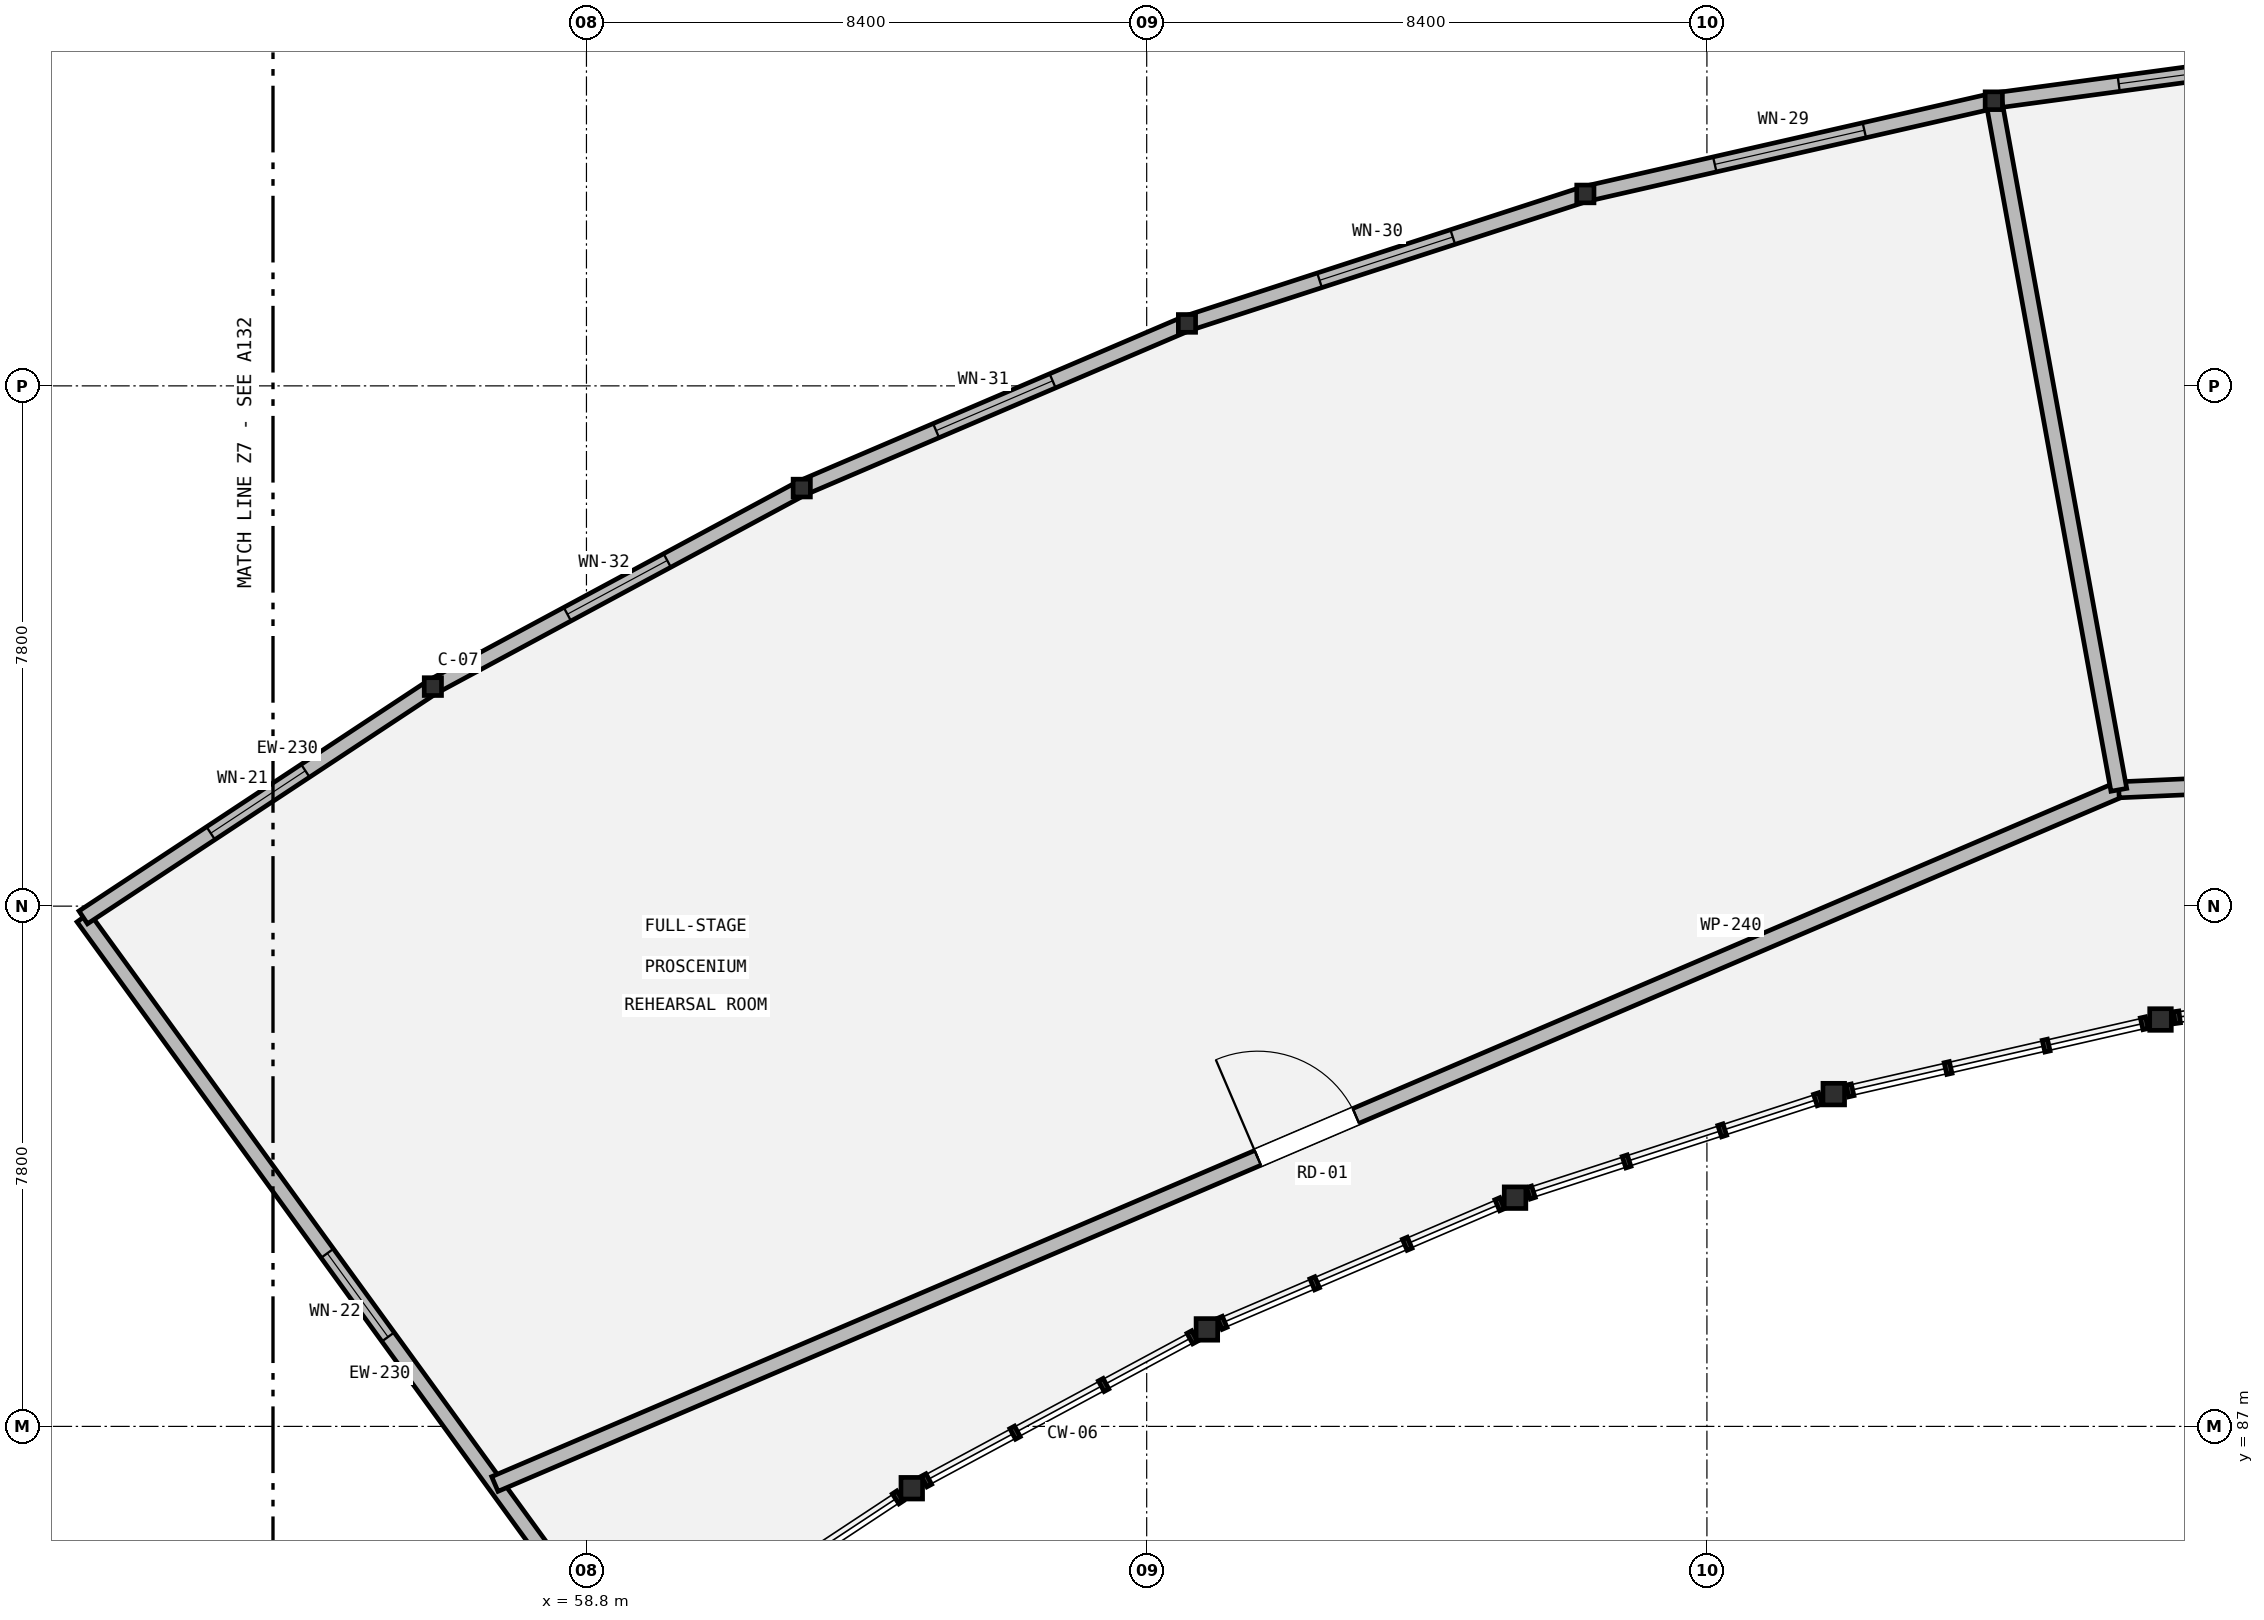
"""IFC4 building model, lengths in metres.
Left out: names, types, materials, properties, quantities, classifications, styles, units other than length and angle.
Written with IfcOpenShell. Run it as: python <this file> out.ifc"""

import sys

from ifc_helpers import new_model, si_unit, direction, frame, frame_2d, origin, origin_2d, place, context, subcontext, project, spatial, rectangle, hollow_circle, i_section, extrude, element, fill, save


model = new_model("IFC4")
c1 = context("Model", 3, precision=1e-05, world=origin(), true_north=direction((0.0, 1.0)))
c2 = subcontext(c1, "Body", "Model", "MODEL_VIEW")
j1 = project(units=[si_unit("LENGTHUNIT", "METRE"), si_unit("PLANEANGLEUNIT", "RADIAN")], contexts=[c1])
p1 = place(None, origin())
s1 = spatial("IfcSite", under=j1, at=p1, CompositionType="ELEMENT")
p2 = place(p1, origin())
s2 = spatial("IfcBuilding", under=s1, at=p2, CompositionType="ELEMENT")
p3 = place(p2, frame((0.0, 0.0, 10.2)))
s3 = spatial("IfcBuildingStorey", under=s2, at=p3, CompositionType="ELEMENT", Elevation=10.2)
p4 = place(p3, frame((51.255, 94.631, 0.0), z_axis=(0.0, 0.0, 1.0), x_axis=(1.0, 0.0, 0.0)))
e1 = element("IfcColumn", 1, at=p4, inside=s3, PredefinedType="COLUMN", context=c2, shape_type="SweptSolid", body=[
    extrude(i_section(OverallWidth=0.259, OverallDepth=0.267, WebThickness=0.013, FlangeThickness=0.021, FilletRadius=0.013, at=origin_2d()), origin(), (0.0, 0.0, 1.0), 4.8),
])
p5 = place(p3, frame((63.677, 86.073, 0.0), z_axis=(0.0, 0.0, 1.0), x_axis=(1.0, 0.0, 0.0)))
e2 = element("IfcColumn", 2, at=p5, inside=s3, PredefinedType="COLUMN", context=c2, shape_type="SweptSolid", body=[
    extrude(hollow_circle(Radius=0.162, WallThickness=0.012, at=origin_2d()), origin(), (0.0, 0.0, 1.0), 4.8),
])
p6 = place(p3, frame((56.497, 98.091, 0.0), z_axis=(0.0, 0.0, 1.0), x_axis=(1.0, 0.0, 0.0)))
e3 = element("IfcColumn", 3, at=p6, inside=s3, PredefinedType="COLUMN", context=c2, shape_type="SweptSolid", body=[
    extrude(i_section(OverallWidth=0.259, OverallDepth=0.267, WebThickness=0.013, FlangeThickness=0.021, FilletRadius=0.013, at=origin_2d()), origin(), (0.0, 0.0, 1.0), 4.8),
])
p7 = place(p3, frame((68.103, 88.454, 0.0), z_axis=(0.0, 0.0, 1.0), x_axis=(1.0, 0.0, 0.0)))
e4 = element("IfcColumn", 4, at=p7, inside=s3, PredefinedType="COLUMN", context=c2, shape_type="SweptSolid", body=[
    extrude(hollow_circle(Radius=0.162, WallThickness=0.012, at=origin_2d()), origin(), (0.0, 0.0, 1.0), 4.8),
])
p8 = place(p3, frame((62.028, 101.068, 0.0), z_axis=(0.0, 0.0, 1.0), x_axis=(1.0, 0.0, 0.0)))
e5 = element("IfcColumn", 5, at=p8, inside=s3, PredefinedType="COLUMN", context=c2, shape_type="SweptSolid", body=[
    extrude(i_section(OverallWidth=0.259, OverallDepth=0.267, WebThickness=0.013, FlangeThickness=0.021, FilletRadius=0.013, at=origin_2d()), origin(), (0.0, 0.0, 1.0), 4.8),
])
p9 = place(p3, frame((72.723, 90.429, 0.0), z_axis=(0.0, 0.0, 1.0), x_axis=(1.0, 0.0, 0.0)))
e6 = element("IfcColumn", 6, at=p9, inside=s3, PredefinedType="COLUMN", context=c2, shape_type="SweptSolid", body=[
    extrude(hollow_circle(Radius=0.162, WallThickness=0.012, at=origin_2d()), origin(), (0.0, 0.0, 1.0), 4.8),
])
p10 = place(p3, frame((67.804, 103.536, 0.0), z_axis=(0.0, 0.0, 1.0), x_axis=(1.0, 0.0, 0.0)))
e7 = element("IfcColumn", 7, at=p10, inside=s3, PredefinedType="COLUMN", context=c2, shape_type="SweptSolid", body=[
    extrude(i_section(OverallWidth=0.259, OverallDepth=0.267, WebThickness=0.013, FlangeThickness=0.021, FilletRadius=0.013, at=origin_2d()), origin(), (0.0, 0.0, 1.0), 4.8),
])
p11 = place(p3, frame((77.502, 91.982, 0.0), z_axis=(0.0, 0.0, 1.0), x_axis=(1.0, 0.0, 0.0)))
e8 = element("IfcColumn", 8, at=p11, inside=s3, PredefinedType="COLUMN", context=c2, shape_type="SweptSolid", body=[
    extrude(hollow_circle(Radius=0.162, WallThickness=0.012, at=origin_2d()), origin(), (0.0, 0.0, 1.0), 4.8),
])
p12 = place(p3, frame((73.777, 105.477, 0.0), z_axis=(0.0, 0.0, 1.0), x_axis=(1.0, 0.0, 0.0)))
e9 = element("IfcColumn", 9, at=p12, inside=s3, PredefinedType="COLUMN", context=c2, shape_type="SweptSolid", body=[
    extrude(i_section(OverallWidth=0.259, OverallDepth=0.267, WebThickness=0.013, FlangeThickness=0.021, FilletRadius=0.013, at=origin_2d()), origin(), (0.0, 0.0, 1.0), 4.8),
])
p13 = place(p3, frame((82.401, 93.1, 0.0), z_axis=(0.0, 0.0, 1.0), x_axis=(1.0, 0.0, 0.0)))
e10 = element("IfcColumn", 10, at=p13, inside=s3, PredefinedType="COLUMN", context=c2, shape_type="SweptSolid", body=[
    extrude(hollow_circle(Radius=0.162, WallThickness=0.012, at=origin_2d()), origin(), (0.0, 0.0, 1.0), 4.8),
])
p14 = place(p3, frame((79.901, 106.875, 0.0), z_axis=(0.0, 0.0, 1.0), x_axis=(1.0, 0.0, 0.0)))
e11 = element("IfcColumn", 11, at=p14, inside=s3, PredefinedType="COLUMN", context=c2, shape_type="SweptSolid", body=[
    extrude(i_section(OverallWidth=0.259, OverallDepth=0.267, WebThickness=0.013, FlangeThickness=0.021, FilletRadius=0.013, at=origin_2d()), origin(), (0.0, 0.0, 1.0), 4.8),
])
p15 = place(p3, frame((59.484, 83.305, 0.0), z_axis=(0.0, 0.0, 1.0), x_axis=(-0.587787980643, 0.809015012105, 0.0)))
e12 = element("IfcWall", 12, at=p15, inside=s3, PredefinedType="STANDARD", context=c2, shape_type="SweptSolid", body=[
    extrude(rectangle(XDim=14.0, YDim=0.23, at=frame_2d((7.0, 0.0))), origin(), (0.0, 0.0, 1.0), 4.059),
])
p16 = place(p15, frame((6.225, 0.0, 0.9)))
e13 = element("IfcOpeningElement", 13, at=p16, cuts=e12, PredefinedType="OPENING", context=c2, shape_type="SweptSolid", body=[
    extrude(rectangle(XDim=1.55, YDim=1.6, at=frame_2d((0.775, 0.8))), frame((0.0, 0.125, 0.0), z_axis=(0.0, -1.0, 0.0), x_axis=(1.0, 0.0, 0.0)), (0.0, 0.0, 1.0), 0.25),
])
p17 = place(p3, frame((51.255, 94.631, 0.0), z_axis=(0.0, 0.0, 1.0), x_axis=(0.834582959038, 0.550882278244, 0.0)))
e14 = element("IfcWall", 14, at=p17, inside=s3, PredefinedType="STANDARD", context=c2, shape_type="SweptSolid", body=[
    extrude(rectangle(XDim=6.281, YDim=0.23, at=frame_2d((3.141, 0.0))), origin(), (0.0, 0.0, 1.0), 4.059),
])
p18 = place(p17, frame((2.291, 0.0, 0.9)))
e15 = element("IfcOpeningElement", 15, at=p18, cuts=e14, PredefinedType="OPENING", context=c2, shape_type="SweptSolid", body=[
    extrude(rectangle(XDim=1.7, YDim=1.6, at=frame_2d((0.85, 0.8))), frame((0.0, 0.125, 0.0), z_axis=(0.0, -1.0, 0.0), x_axis=(1.0, 0.0, 0.0)), (0.0, 0.0, 1.0), 0.25),
])
p19 = place(p3, frame((56.497, 98.091, 0.0), z_axis=(0.0, 0.0, 1.0), x_axis=(0.880582156138, 0.473893517883, 0.0)))
e16 = element("IfcWall", 16, at=p19, inside=s3, PredefinedType="STANDARD", context=c2, shape_type="SweptSolid", body=[
    extrude(rectangle(XDim=6.281, YDim=0.23, at=frame_2d((3.141, 0.0))), origin(), (0.0, 0.0, 1.0), 4.059),
])
p20 = place(p19, frame((2.291, 0.0, 0.9)))
e17 = element("IfcOpeningElement", 17, at=p20, cuts=e16, PredefinedType="OPENING", context=c2, shape_type="SweptSolid", body=[
    extrude(rectangle(XDim=1.7, YDim=1.95, at=frame_2d((0.85, 0.975))), frame((0.0, 0.125, 0.0), z_axis=(0.0, -1.0, 0.0), x_axis=(1.0, 0.0, 0.0)), (0.0, 0.0, 1.0), 0.25),
])
p21 = place(p3, frame((62.028, 101.068, 0.0), z_axis=(0.0, 0.0, 1.0), x_axis=(0.919534614305, 0.393009024189, 0.0)))
e18 = element("IfcWall", 18, at=p21, inside=s3, PredefinedType="STANDARD", context=c2, shape_type="SweptSolid", body=[
    extrude(rectangle(XDim=6.281, YDim=0.23, at=frame_2d((3.141, 0.0))), origin(), (0.0, 0.0, 1.0), 4.059),
])
p22 = place(p21, frame((2.191, 0.0, 0.9)))
e19 = element("IfcOpeningElement", 19, at=p22, cuts=e18, PredefinedType="OPENING", context=c2, shape_type="SweptSolid", body=[
    extrude(rectangle(XDim=1.9, YDim=1.95, at=frame_2d((0.95, 0.975))), frame((0.0, 0.125, 0.0), z_axis=(0.0, -1.0, 0.0), x_axis=(1.0, 0.0, 0.0)), (0.0, 0.0, 1.0), 0.25),
])
p23 = place(p3, frame((67.804, 103.536, 0.0), z_axis=(0.0, 0.0, 1.0), x_axis=(0.951058059905, 0.309012243593, 0.0)))
e20 = element("IfcWall", 20, at=p23, inside=s3, PredefinedType="STANDARD", context=c2, shape_type="SweptSolid", body=[
    extrude(rectangle(XDim=6.281, YDim=0.23, at=frame_2d((3.141, 0.0))), origin(), (0.0, 0.0, 1.0), 4.059),
])
p24 = place(p23, frame((2.091, 0.0, 0.9)))
e21 = element("IfcOpeningElement", 21, at=p24, cuts=e20, PredefinedType="OPENING", context=c2, shape_type="SweptSolid", body=[
    extrude(rectangle(XDim=2.1, YDim=1.95, at=frame_2d((1.05, 0.975))), frame((0.0, 0.125, 0.0), z_axis=(0.0, -1.0, 0.0), x_axis=(1.0, 0.0, 0.0)), (0.0, 0.0, 1.0), 0.25),
])
p25 = place(p3, frame((73.777, 105.477, 0.0), z_axis=(0.0, 0.0, 1.0), x_axis=(0.974926249486, 0.222528218575, 0.0)))
e22 = element("IfcWall", 22, at=p25, inside=s3, PredefinedType="STANDARD", context=c2, shape_type="SweptSolid", body=[
    extrude(rectangle(XDim=6.281, YDim=0.23, at=frame_2d((3.141, 0.0))), origin(), (0.0, 0.0, 1.0), 4.059),
])
p26 = place(p25, frame((1.99, 0.0, 0.9)))
e23 = element("IfcOpeningElement", 23, at=p26, cuts=e22, PredefinedType="OPENING", context=c2, shape_type="SweptSolid", body=[
    extrude(rectangle(XDim=2.3, YDim=1.95, at=frame_2d((1.15, 0.975))), frame((0.0, 0.125, 0.0), z_axis=(0.0, -1.0, 0.0), x_axis=(1.0, 0.0, 0.0)), (0.0, 0.0, 1.0), 0.25),
])
p27 = place(p3, frame((79.901, 106.875, 0.0), z_axis=(0.0, 0.0, 1.0), x_axis=(0.990947344037, 0.134251113014, 0.0)))
e24 = element("IfcWall", 24, at=p27, inside=s3, PredefinedType="STANDARD", context=c2, shape_type="SweptSolid", body=[
    extrude(rectangle(XDim=6.281, YDim=0.23, at=frame_2d((3.141, 0.0))), origin(), (0.0, 0.0, 1.0), 4.059),
])
p28 = place(p27, frame((1.89, 0.0, 0.9)))
e25 = element("IfcOpeningElement", 25, at=p28, cuts=e24, PredefinedType="OPENING", context=c2, shape_type="SweptSolid", body=[
    extrude(rectangle(XDim=2.5, YDim=1.95, at=frame_2d((1.25, 0.975))), frame((0.0, 0.125, 0.0), z_axis=(0.0, -1.0, 0.0), x_axis=(1.0, 0.0, 0.0)), (0.0, 0.0, 1.0), 0.25),
])
p29 = place(p3, frame((57.427, 86.136, 0.0), z_axis=(0.0, 0.0, 1.0), x_axis=(0.919528963336, 0.393022245664, 0.0)))
e26 = element("IfcWall", 26, at=p29, inside=s3, PredefinedType="PARTITIONING", context=c2, shape_type="SweptSolid", body=[
    extrude(rectangle(XDim=26.48, YDim=0.24, at=frame_2d((13.24, 0.0))), origin(), (0.0, 0.0, 1.0), 4.059),
])
p30 = place(p29, frame((12.44, 0.0, 0.0)))
e27 = element("IfcOpeningElement", 27, at=p30, cuts=e26, PredefinedType="OPENING", context=c2, shape_type="SweptSolid", body=[
    extrude(rectangle(XDim=1.6, YDim=2.25, at=frame_2d((0.8, 1.125))), frame((0.0, 0.13, 0.0), z_axis=(0.0, -1.0, 0.0), x_axis=(1.0, 0.0, 0.0)), (0.0, 0.0, 1.0), 0.26),
])
p31 = place(p3, frame((81.776, 96.544, 0.0), z_axis=(0.0, 0.0, 1.0), x_axis=(0.998992662888, 0.044873817482, 0.0)))
e28 = element("IfcWall", 28, at=p31, inside=s3, PredefinedType="PARTITIONING", context=c2, shape_type="SweptSolid", body=[
    extrude(rectangle(XDim=15.974, YDim=0.24, at=frame_2d((7.987, 0.0))), origin(), (0.0, 0.0, 1.0), 4.059),
])
p32 = place(p31, frame((7.187, 0.0, 0.0)))
e29 = element("IfcOpeningElement", 29, at=p32, cuts=e28, PredefinedType="OPENING", context=c2, shape_type="SweptSolid", body=[
    extrude(rectangle(XDim=1.6, YDim=2.25, at=frame_2d((0.8, 1.125))), frame((0.0, 0.13, 0.0), z_axis=(0.0, -1.0, 0.0), x_axis=(1.0, 0.0, 0.0)), (0.0, 0.0, 1.0), 0.26),
])
p33 = place(p3, frame((81.776, 96.544, 0.0), z_axis=(0.0, 0.0, 1.0), x_axis=(-0.178570326803, 0.983927150954, 0.0)))
e30 = element("IfcWall", 30, at=p33, inside=s3, PredefinedType="PARTITIONING", context=c2, shape_type="SweptSolid", body=[
    extrude(rectangle(XDim=10.5, YDim=0.24, at=frame_2d((5.25, 0.0))), origin(), (0.0, 0.0, 1.0), 4.059),
])
p34 = place(p16, origin())
e31 = element("IfcWindow", 31, at=p34, inside=s3, PartitioningType="SINGLE_PANEL", PredefinedType="WINDOW", context=c2, shape_type="SweptSolid", body=[
    extrude(rectangle(XDim=1.55, YDim=1.6, at=frame_2d((0.775, 0.8))), frame((0.0, 0.03, 0.0), z_axis=(0.0, -1.0, 0.0), x_axis=(1.0, 0.0, 0.0)), (0.0, 0.0, 1.0), 0.06),
])
fill(e13, e31)
p35 = place(p18, origin())
e32 = element("IfcWindow", 32, at=p35, inside=s3, PartitioningType="SINGLE_PANEL", PredefinedType="WINDOW", context=c2, shape_type="SweptSolid", body=[
    extrude(rectangle(XDim=1.7, YDim=1.6, at=frame_2d((0.85, 0.8))), frame((0.0, 0.03, 0.0), z_axis=(0.0, -1.0, 0.0), x_axis=(1.0, 0.0, 0.0)), (0.0, 0.0, 1.0), 0.06),
])
fill(e15, e32)
p36 = place(p20, origin())
e33 = element("IfcWindow", 33, at=p36, inside=s3, PartitioningType="SINGLE_PANEL", PredefinedType="WINDOW", context=c2, shape_type="SweptSolid", body=[
    extrude(rectangle(XDim=1.7, YDim=1.95, at=frame_2d((0.85, 0.975))), frame((0.0, 0.03, 0.0), z_axis=(0.0, -1.0, 0.0), x_axis=(1.0, 0.0, 0.0)), (0.0, 0.0, 1.0), 0.06),
])
fill(e17, e33)
p37 = place(p22, origin())
e34 = element("IfcWindow", 34, at=p37, inside=s3, PartitioningType="SINGLE_PANEL", PredefinedType="WINDOW", context=c2, shape_type="SweptSolid", body=[
    extrude(rectangle(XDim=1.9, YDim=1.95, at=frame_2d((0.95, 0.975))), frame((0.0, 0.03, 0.0), z_axis=(0.0, -1.0, 0.0), x_axis=(1.0, 0.0, 0.0)), (0.0, 0.0, 1.0), 0.06),
])
fill(e19, e34)
p38 = place(p24, origin())
e35 = element("IfcWindow", 35, at=p38, inside=s3, PartitioningType="SINGLE_PANEL", PredefinedType="WINDOW", context=c2, shape_type="SweptSolid", body=[
    extrude(rectangle(XDim=2.1, YDim=1.95, at=frame_2d((1.05, 0.975))), frame((0.0, 0.03, 0.0), z_axis=(0.0, -1.0, 0.0), x_axis=(1.0, 0.0, 0.0)), (0.0, 0.0, 1.0), 0.06),
])
fill(e21, e35)
p39 = place(p26, origin())
e36 = element("IfcWindow", 36, at=p39, inside=s3, PartitioningType="SINGLE_PANEL", PredefinedType="WINDOW", context=c2, shape_type="SweptSolid", body=[
    extrude(rectangle(XDim=2.3, YDim=1.95, at=frame_2d((1.15, 0.975))), frame((0.0, 0.03, 0.0), z_axis=(0.0, -1.0, 0.0), x_axis=(1.0, 0.0, 0.0)), (0.0, 0.0, 1.0), 0.06),
])
fill(e23, e36)
p40 = place(p28, origin())
e37 = element("IfcWindow", 37, at=p40, inside=s3, PartitioningType="SINGLE_PANEL", PredefinedType="WINDOW", context=c2, shape_type="SweptSolid", body=[
    extrude(rectangle(XDim=2.5, YDim=1.95, at=frame_2d((1.25, 0.975))), frame((0.0, 0.03, 0.0), z_axis=(0.0, -1.0, 0.0), x_axis=(1.0, 0.0, 0.0)), (0.0, 0.0, 1.0), 0.06),
])
fill(e25, e37)
p41 = place(p30, origin())
e38 = element("IfcDoor", 38, at=p41, inside=s3, OperationType="SINGLE_SWING_LEFT", PredefinedType="DOOR", context=c2, shape_type="SweptSolid", body=[
    extrude(rectangle(XDim=1.6, YDim=2.25, at=frame_2d((0.8, 1.125))), frame((0.0, 0.025, 0.0), z_axis=(0.0, -1.0, 0.0), x_axis=(1.0, 0.0, 0.0)), (0.0, 0.0, 1.0), 0.05),
])
fill(e27, e38)
save(model, sys.argv[1])
